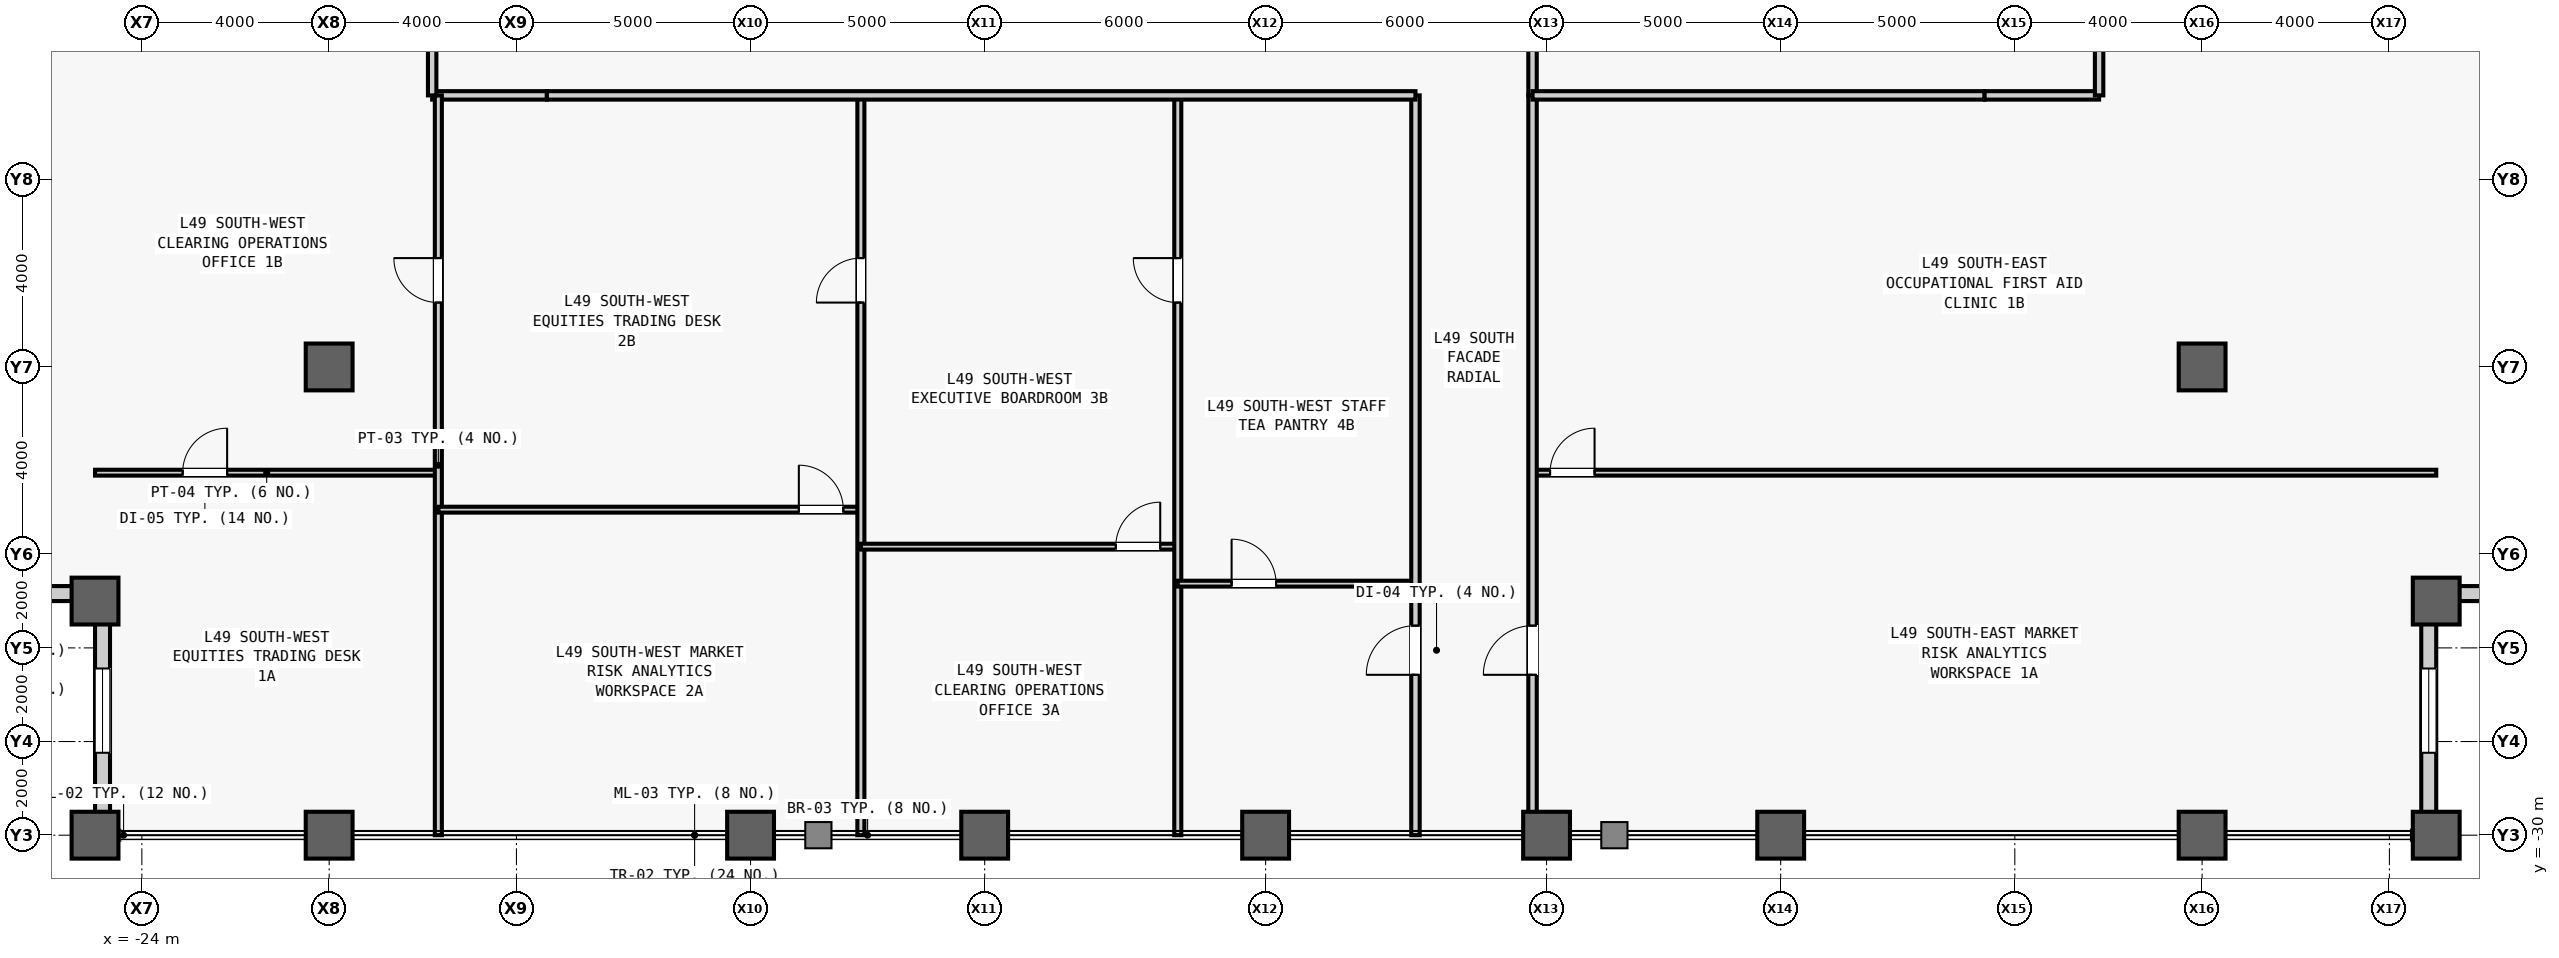
"""IFC4 building model, lengths in metres.
Left out: names, types, materials, properties, quantities, classifications, styles, units other than length and angle.
Written with IfcOpenShell. Run it as: python <this file> out.ifc"""

import sys

from ifc_helpers import new_model, si_unit, direction, frame, frame_2d, origin, origin_2d, place, context, subcontext, project, spatial, rectangle, hollow_rectangle, extrude, source, transform, mapped, element, fill, save


model = new_model("IFC4")
c1 = context("Model", 3, precision=1e-05, world=origin(), true_north=direction((0.0, 1.0)))
c2 = subcontext(c1, "Body", "Model", "MODEL_VIEW")
j1 = project(units=[si_unit("LENGTHUNIT", "METRE"), si_unit("PLANEANGLEUNIT", "RADIAN")], contexts=[c1])
p1 = place(None, origin())
s1 = spatial("IfcSite", under=j1, at=p1, CompositionType="ELEMENT")
p2 = place(p1, origin())
s2 = spatial("IfcBuilding", under=s1, at=p2, CompositionType="ELEMENT")
p3 = place(p2, frame((0.0, 0.0, 211.1)))
s3 = spatial("IfcBuildingStorey", under=s2, at=p3, CompositionType="ELEMENT", Elevation=211.1)
m1 = source(origin(), c2, "Body", "SweptSolid", [
    extrude(hollow_rectangle(XDim=1.0, YDim=1.0, WallThickness=0.055, at=origin_2d()), origin(), (0.0, 0.0, 1.0), 4.0),
])
for number, where, z_axis, x_axis in (
    (1, (-25.0, -30.0, 0.0), (0.0, 0.0, 1.0), (1.0, 0.0, 0.0)),
    (2, (-25.0, -25.0, 0.0), (0.0, 0.0, 1.0), (1.0, 0.0, 0.0)),
    (3, (-20.0, -30.0, 0.0), (0.0, 0.0, 1.0), (1.0, 0.0, 0.0)),
    (4, (-20.0, -20.0, 0.0), (0.0, 0.0, 1.0), (1.0, 0.0, 0.0)),
    (5, (-11.0, -30.0, 0.0), (0.0, 0.0, 1.0), (1.0, 0.0, 0.0)),
    (6, (-6.0, -30.0, 0.0), (0.0, 0.0, 1.0), (1.0, 0.0, 0.0)),
    (7, (0.0, -30.0, 0.0), (0.0, 0.0, 1.0), (1.0, 0.0, 0.0)),
    (8, (6.0, -30.0, 0.0), (0.0, 0.0, 1.0), (1.0, 0.0, 0.0)),
    (9, (11.0, -30.0, 0.0), (0.0, 0.0, 1.0), (1.0, 0.0, 0.0)),
    (10, (20.0, -30.0, 0.0), (0.0, 0.0, 1.0), (1.0, 0.0, 0.0)),
    (11, (20.0, -20.0, 0.0), (0.0, 0.0, 1.0), (1.0, 0.0, 0.0)),
    (12, (25.0, -30.0, 0.0), (0.0, 0.0, 1.0), (1.0, 0.0, 0.0)),
    (13, (25.0, -25.0, 0.0), (0.0, 0.0, 1.0), (1.0, 0.0, 0.0)),
):
    element("IfcColumn", number, at=place(p3, frame(where, z_axis=z_axis, x_axis=x_axis)), inside=s3, PredefinedType="COLUMN", context=c2, shape_type="MappedRepresentation", body=[
        mapped(m1, transform((0.0, 0.0, 0.0), scale=1.0)),
    ])
m2 = source(origin(), c2, "Body", "SweptSolid", [
    extrude(rectangle(XDim=4.68, YDim=0.32, at=frame_2d((2.34, 0.0))), origin(), (0.0, 0.0, 1.0), 3.164),
])
p4 = place(p3, frame((-25.0, -24.84, 0.0), z_axis=(0.0, 0.0, 1.0), x_axis=(-1.0, 0.0, 0.0)))
e14 = element("IfcWall", 14, at=p4, inside=s3, PredefinedType="STANDARD", context=c2, shape_type="MappedRepresentation", body=[
    mapped(m2, transform((0.0, 0.0, 0.0), scale=1.0)),
])
m3 = source(origin(), c2, "Body", "SweptSolid", [
    extrude(rectangle(XDim=1.8, YDim=2.4, at=frame_2d((0.9, 1.2))), frame((0.0, 0.17, 0.0), z_axis=(0.0, -1.0, 0.0), x_axis=(1.0, 0.0, 0.0)), (0.0, 0.0, 1.0), 0.34),
])
p5 = place(p4, frame((1.44, 0.0, 0.5)))
e15 = element("IfcOpeningElement", 15, at=p5, cuts=e14, PredefinedType="OPENING", context=c2, shape_type="MappedRepresentation", body=[
    mapped(m3, transform((0.0, 0.0, 0.0), scale=1.0)),
])
p6 = place(p3, frame((-24.84, -29.68, 0.0), z_axis=(0.0, 0.0, 1.0), x_axis=(0.0, 1.0, 0.0)))
e16 = element("IfcWall", 16, at=p6, inside=s3, PredefinedType="STANDARD", context=c2, shape_type="MappedRepresentation", body=[
    mapped(m2, transform((0.0, 0.0, 0.0), scale=1.0)),
])
p7 = place(p6, frame((1.44, 0.0, 0.5)))
e17 = element("IfcOpeningElement", 17, at=p7, cuts=e16, PredefinedType="OPENING", context=c2, shape_type="MappedRepresentation", body=[
    mapped(m3, transform((0.0, 0.0, 0.0), scale=1.0)),
])
p8 = place(p3, frame((24.84, -29.68, 0.0), z_axis=(0.0, 0.0, 1.0), x_axis=(0.0, 1.0, 0.0)))
e18 = element("IfcWall", 18, at=p8, inside=s3, PredefinedType="STANDARD", context=c2, shape_type="MappedRepresentation", body=[
    mapped(m2, transform((0.0, 0.0, 0.0), scale=1.0)),
])
p9 = place(p8, frame((1.44, 0.0, 0.5)))
e19 = element("IfcOpeningElement", 19, at=p9, cuts=e18, PredefinedType="OPENING", context=c2, shape_type="MappedRepresentation", body=[
    mapped(m3, transform((0.0, 0.0, 0.0), scale=1.0)),
])
p10 = place(p3, frame((25.0, -24.84, 0.0), z_axis=(0.0, 0.0, 1.0), x_axis=(1.0, 0.0, 0.0)))
e20 = element("IfcWall", 20, at=p10, inside=s3, PredefinedType="STANDARD", context=c2, shape_type="MappedRepresentation", body=[
    mapped(m2, transform((0.0, 0.0, 0.0), scale=1.0)),
])
p11 = place(p10, frame((1.44, 0.0, 0.5)))
e21 = element("IfcOpeningElement", 21, at=p11, cuts=e20, PredefinedType="OPENING", context=c2, shape_type="MappedRepresentation", body=[
    mapped(m3, transform((0.0, 0.0, 0.0), scale=1.0)),
])
m4 = source(origin(), c2, "Body", "SweptSolid", [
    extrude(rectangle(XDim=2.45, YDim=0.18, at=frame_2d((1.225, 0.0))), origin(), (0.0, 0.0, 1.0), 3.78),
])
for number, where, z_axis, x_axis in (
    (22, (15.35, -14.2, 0.0), (0.0, 0.0, 1.0), (1.0, 0.0, 0.0)),
    (23, (-17.8, -14.2, 0.0), (0.0, 0.0, 1.0), (1.0, 0.0, 0.0)),
):
    element("IfcWall", number, at=place(p3, frame(where, z_axis=z_axis, x_axis=x_axis)), inside=s3, PredefinedType="PARTITIONING", context=c2, shape_type="MappedRepresentation", body=[
        mapped(m4, transform((0.0, 0.0, 0.0), scale=1.0)),
    ])
m5 = source(origin(), c2, "Body", "SweptSolid", [
    extrude(rectangle(XDim=3.2, YDim=0.18, at=frame_2d((1.6, 0.0))), origin(), (0.0, 0.0, 1.0), 3.085),
])
p12 = place(p3, frame((5.7, -14.2, 0.0), z_axis=(0.0, 0.0, 1.0), x_axis=(0.0, 1.0, 0.0)))
e24 = element("IfcWall", 24, at=p12, inside=s3, PredefinedType="PARTITIONING", context=c2, shape_type="MappedRepresentation", body=[
    mapped(m5, transform((0.0, 0.0, 0.0), scale=1.0)),
])
m6 = source(origin(), c2, "Body", "SweptSolid", [
    extrude(rectangle(XDim=7.332, YDim=0.125, at=frame_2d((3.666, 0.0))), origin(), (0.0, 0.0, 1.0), 3.78),
])
p13 = place(p3, frame((-25.0, -22.258, 0.0), z_axis=(0.0, 0.0, 1.0), x_axis=(1.0, 0.0, 0.0)))
e25 = element("IfcWall", 25, at=p13, inside=s3, PredefinedType="PARTITIONING", context=c2, shape_type="MappedRepresentation", body=[
    mapped(m6, transform((0.0, 0.0, 0.0), scale=1.0)),
])
m7 = source(origin(), c2, "Body", "SweptSolid", [
    extrude(rectangle(XDim=0.95, YDim=2.15, at=frame_2d((0.475, 1.075))), frame((0.0, 0.073, 0.0), z_axis=(0.0, -1.0, 0.0), x_axis=(1.0, 0.0, 0.0)), (0.0, 0.0, 1.0), 0.145),
])
p14 = place(p13, frame((1.871, 0.0, 0.0)))
e26 = element("IfcOpeningElement", 26, at=p14, cuts=e25, PredefinedType="OPENING", context=c2, shape_type="MappedRepresentation", body=[
    mapped(m7, transform((0.0, 0.0, 0.0), scale=1.0)),
])
m8 = source(origin(), c2, "Body", "SweptSolid", [
    extrude(rectangle(XDim=15.8, YDim=0.15, at=frame_2d((7.9, 0.0))), origin(), (0.0, 0.0, 1.0), 3.78),
])
p15 = place(p3, frame((-17.668, -30.0, 0.0), z_axis=(0.0, 0.0, 1.0), x_axis=(0.0, 1.0, 0.0)))
e27 = element("IfcWall", 27, at=p15, inside=s3, PredefinedType="PARTITIONING", context=c2, shape_type="MappedRepresentation", body=[
    mapped(m8, transform((0.0, 0.0, 0.0), scale=1.0)),
])
m9 = source(origin(), c2, "Body", "SweptSolid", [
    extrude(rectangle(XDim=0.95, YDim=2.15, at=frame_2d((0.475, 1.075))), frame((0.0, 0.085, 0.0), z_axis=(0.0, -1.0, 0.0), x_axis=(1.0, 0.0, 0.0)), (0.0, 0.0, 1.0), 0.17),
])
p16 = place(p15, frame((11.375, 0.0, 0.0)))
e28 = element("IfcOpeningElement", 28, at=p16, cuts=e27, PredefinedType="OPENING", context=c2, shape_type="MappedRepresentation", body=[
    mapped(m9, transform((0.0, 0.0, 0.0), scale=1.0)),
])
m10 = source(origin(), c2, "Body", "SweptSolid", [
    extrude(rectangle(XDim=9.024, YDim=0.125, at=frame_2d((4.512, 0.0))), origin(), (0.0, 0.0, 1.0), 3.78),
])
p17 = place(p3, frame((-17.668, -23.048, 0.0), z_axis=(0.0, 0.0, 1.0), x_axis=(1.0, 0.0, 0.0)))
e29 = element("IfcWall", 29, at=p17, inside=s3, PredefinedType="PARTITIONING", context=c2, shape_type="MappedRepresentation", body=[
    mapped(m10, transform((0.0, 0.0, 0.0), scale=1.0)),
])
p18 = place(p17, frame((7.699, 0.0, 0.0)))
e30 = element("IfcOpeningElement", 30, at=p18, cuts=e29, PredefinedType="OPENING", context=c2, shape_type="MappedRepresentation", body=[
    mapped(m7, transform((0.0, 0.0, 0.0), scale=1.0)),
])
p19 = place(p3, frame((-8.644, -30.0, 0.0), z_axis=(0.0, 0.0, 1.0), x_axis=(0.0, 1.0, 0.0)))
e31 = element("IfcWall", 31, at=p19, inside=s3, PredefinedType="PARTITIONING", context=c2, shape_type="MappedRepresentation", body=[
    mapped(m8, transform((0.0, 0.0, 0.0), scale=1.0)),
])
p20 = place(p19, frame((11.375, 0.0, 0.0)))
e32 = element("IfcOpeningElement", 32, at=p20, cuts=e31, PredefinedType="OPENING", context=c2, shape_type="MappedRepresentation", body=[
    mapped(m9, transform((0.0, 0.0, 0.0), scale=1.0)),
])
m11 = source(origin(), c2, "Body", "SweptSolid", [
    extrude(rectangle(XDim=6.768, YDim=0.125, at=frame_2d((3.384, 0.0))), origin(), (0.0, 0.0, 1.0), 3.78),
])
p21 = place(p3, frame((-8.644, -23.838, 0.0), z_axis=(0.0, 0.0, 1.0), x_axis=(1.0, 0.0, 0.0)))
e33 = element("IfcWall", 33, at=p21, inside=s3, PredefinedType="PARTITIONING", context=c2, shape_type="MappedRepresentation", body=[
    mapped(m11, transform((0.0, 0.0, 0.0), scale=1.0)),
])
p22 = place(p21, frame((5.443, 0.0, 0.0)))
e34 = element("IfcOpeningElement", 34, at=p22, cuts=e33, PredefinedType="OPENING", context=c2, shape_type="MappedRepresentation", body=[
    mapped(m7, transform((0.0, 0.0, 0.0), scale=1.0)),
])
p23 = place(p3, frame((-1.876, -30.0, 0.0), z_axis=(0.0, 0.0, 1.0), x_axis=(0.0, 1.0, 0.0)))
e35 = element("IfcWall", 35, at=p23, inside=s3, PredefinedType="PARTITIONING", context=c2, shape_type="MappedRepresentation", body=[
    mapped(m8, transform((0.0, 0.0, 0.0), scale=1.0)),
])
p24 = place(p23, frame((11.375, 0.0, 0.0)))
e36 = element("IfcOpeningElement", 36, at=p24, cuts=e35, PredefinedType="OPENING", context=c2, shape_type="MappedRepresentation", body=[
    mapped(m9, transform((0.0, 0.0, 0.0), scale=1.0)),
])
m12 = source(origin(), c2, "Body", "SweptSolid", [
    extrude(rectangle(XDim=5.076, YDim=0.125, at=frame_2d((2.538, 0.0))), origin(), (0.0, 0.0, 1.0), 3.78),
])
p25 = place(p3, frame((-1.876, -24.628, 0.0), z_axis=(0.0, 0.0, 1.0), x_axis=(1.0, 0.0, 0.0)))
e37 = element("IfcWall", 37, at=p25, inside=s3, PredefinedType="PARTITIONING", context=c2, shape_type="MappedRepresentation", body=[
    mapped(m12, transform((0.0, 0.0, 0.0), scale=1.0)),
])
p26 = place(p25, frame((1.149, 0.0, 0.0)))
e38 = element("IfcOpeningElement", 38, at=p26, cuts=e37, PredefinedType="OPENING", context=c2, shape_type="MappedRepresentation", body=[
    mapped(m7, transform((0.0, 0.0, 0.0), scale=1.0)),
])
m13 = source(origin(), c2, "Body", "SweptSolid", [
    extrude(rectangle(XDim=15.8, YDim=0.18, at=frame_2d((7.9, 0.0))), origin(), (0.0, 0.0, 1.0), 3.78),
])
p27 = place(p3, frame((3.2, -30.0, 0.0), z_axis=(0.0, 0.0, 1.0), x_axis=(0.0, 1.0, 0.0)))
e39 = element("IfcWall", 39, at=p27, inside=s3, PredefinedType="PARTITIONING", context=c2, shape_type="MappedRepresentation", body=[
    mapped(m13, transform((0.0, 0.0, 0.0), scale=1.0)),
])
m14 = source(origin(), c2, "Body", "SweptSolid", [
    extrude(rectangle(XDim=1.05, YDim=2.2, at=frame_2d((0.525, 1.1))), frame((0.0, 0.1, 0.0), z_axis=(0.0, -1.0, 0.0), x_axis=(1.0, 0.0, 0.0)), (0.0, 0.0, 1.0), 0.2),
])
p28 = place(p27, frame((3.425, 0.0, 0.0)))
e40 = element("IfcOpeningElement", 40, at=p28, cuts=e39, PredefinedType="OPENING", context=c2, shape_type="MappedRepresentation", body=[
    mapped(m14, transform((0.0, 0.0, 0.0), scale=1.0)),
])
m15 = source(origin(), c2, "Body", "SweptSolid", [
    extrude(rectangle(XDim=18.55, YDim=0.18, at=frame_2d((9.275, 0.0))), origin(), (0.0, 0.0, 1.0), 3.78),
])
p29 = place(p3, frame((-15.35, -14.2, 0.0), z_axis=(0.0, 0.0, 1.0), x_axis=(1.0, 0.0, 0.0)))
e41 = element("IfcWall", 41, at=p29, inside=s3, PredefinedType="PARTITIONING", context=c2, shape_type="MappedRepresentation", body=[
    mapped(m15, transform((0.0, 0.0, 0.0), scale=1.0)),
])
m16 = source(origin(), c2, "Body", "SweptSolid", [
    extrude(rectangle(XDim=19.3, YDim=0.125, at=frame_2d((9.65, 0.0))), origin(), (0.0, 0.0, 1.0), 3.78),
])
p30 = place(p3, frame((5.7, -22.258, 0.0), z_axis=(0.0, 0.0, 1.0), x_axis=(1.0, 0.0, 0.0)))
e42 = element("IfcWall", 42, at=p30, inside=s3, PredefinedType="PARTITIONING", context=c2, shape_type="MappedRepresentation", body=[
    mapped(m16, transform((0.0, 0.0, 0.0), scale=1.0)),
])
p31 = place(p30, frame((0.375, 0.0, 0.0)))
e43 = element("IfcOpeningElement", 43, at=p31, cuts=e42, PredefinedType="OPENING", context=c2, shape_type="MappedRepresentation", body=[
    mapped(m7, transform((0.0, 0.0, 0.0), scale=1.0)),
])
m17 = source(origin(), c2, "Body", "SweptSolid", [
    extrude(rectangle(XDim=15.8, YDim=0.18, at=frame_2d((7.9, 0.0))), origin(), (0.0, 0.0, 1.0), 3.085),
])
p32 = place(p3, frame((5.7, -30.0, 0.0), z_axis=(0.0, 0.0, 1.0), x_axis=(0.0, 1.0, 0.0)))
e44 = element("IfcWall", 44, at=p32, inside=s3, PredefinedType="PARTITIONING", context=c2, shape_type="MappedRepresentation", body=[
    mapped(m17, transform((0.0, 0.0, 0.0), scale=1.0)),
])
p33 = place(p32, frame((3.425, 0.0, 0.0)))
e45 = element("IfcOpeningElement", 45, at=p33, cuts=e44, PredefinedType="OPENING", context=c2, shape_type="MappedRepresentation", body=[
    mapped(m14, transform((0.0, 0.0, 0.0), scale=1.0)),
])
m18 = source(origin(), c2, "Body", "SweptSolid", [
    extrude(rectangle(XDim=9.65, YDim=0.18, at=frame_2d((4.825, 0.0))), origin(), (0.0, 0.0, 1.0), 3.78),
])
p34 = place(p3, frame((5.7, -14.2, 0.0), z_axis=(0.0, 0.0, 1.0), x_axis=(1.0, 0.0, 0.0)))
e46 = element("IfcWall", 46, at=p34, inside=s3, PredefinedType="PARTITIONING", context=c2, shape_type="MappedRepresentation", body=[
    mapped(m18, transform((0.0, 0.0, 0.0), scale=1.0)),
])
m19 = source(origin(), c2, "Body", "SweptSolid", [
    extrude(rectangle(XDim=13.25, YDim=0.18, at=frame_2d((6.625, 0.0))), origin(), (0.0, 0.0, 1.0), 3.78),
])
p35 = place(p3, frame((-17.8, -14.2, 0.0), z_axis=(0.0, 0.0, 1.0), x_axis=(0.0, 1.0, 0.0)))
e47 = element("IfcWall", 47, at=p35, inside=s3, PredefinedType="PARTITIONING", context=c2, shape_type="MappedRepresentation", body=[
    mapped(m19, transform((0.0, 0.0, 0.0), scale=1.0)),
])
m20 = source(origin(), c2, "Body", "SweptSolid", [
    extrude(rectangle(XDim=14.75, YDim=0.18, at=frame_2d((7.375, 0.0))), origin(), (0.0, 0.0, 1.0), 3.78),
])
p36 = place(p3, frame((17.8, -14.2, 0.0), z_axis=(0.0, 0.0, 1.0), x_axis=(0.0, 1.0, 0.0)))
e48 = element("IfcWall", 48, at=p36, inside=s3, PredefinedType="PARTITIONING", context=c2, shape_type="MappedRepresentation", body=[
    mapped(m20, transform((0.0, 0.0, 0.0), scale=1.0)),
])
m21 = source(origin(), c2, "Body", "SweptSolid", [
    extrude(rectangle(XDim=1.8, YDim=2.4, at=frame_2d((0.9, 1.2))), frame((0.0, 0.03, 0.0), z_axis=(0.0, -1.0, 0.0), x_axis=(1.0, 0.0, 0.0)), (0.0, 0.0, 1.0), 0.06),
])
p37 = place(p7, origin())
e49 = element("IfcWindow", 49, at=p37, inside=s3, PartitioningType="SINGLE_PANEL", PredefinedType="WINDOW", context=c2, shape_type="MappedRepresentation", body=[
    mapped(m21, transform((0.0, 0.0, 0.0), scale=1.0)),
])
fill(e17, e49)
p38 = place(p9, origin())
e50 = element("IfcWindow", 50, at=p38, inside=s3, PartitioningType="SINGLE_PANEL", PredefinedType="WINDOW", context=c2, shape_type="MappedRepresentation", body=[
    mapped(m21, transform((0.0, 0.0, 0.0), scale=1.0)),
])
fill(e19, e50)
m22 = source(origin(), c2, "Body", "SweptSolid", [
    extrude(rectangle(XDim=0.95, YDim=2.15, at=frame_2d((0.475, 1.075))), frame((0.0, 0.025, 0.0), z_axis=(0.0, -1.0, 0.0), x_axis=(1.0, 0.0, 0.0)), (0.0, 0.0, 1.0), 0.05),
])
p39 = place(p14, origin())
e51 = element("IfcDoor", 51, at=p39, inside=s3, OperationType="SINGLE_SWING_RIGHT", PredefinedType="DOOR", context=c2, shape_type="MappedRepresentation", body=[
    mapped(m22, transform((0.0, 0.0, 0.0), scale=1.0)),
])
fill(e26, e51)
p40 = place(p16, origin())
e52 = element("IfcDoor", 52, at=p40, inside=s3, OperationType="SINGLE_SWING_RIGHT", PredefinedType="DOOR", context=c2, shape_type="MappedRepresentation", body=[
    mapped(m22, transform((0.0, 0.0, 0.0), scale=1.0)),
])
fill(e28, e52)
p41 = place(p18, origin())
e53 = element("IfcDoor", 53, at=p41, inside=s3, OperationType="SINGLE_SWING_LEFT", PredefinedType="DOOR", context=c2, shape_type="MappedRepresentation", body=[
    mapped(m22, transform((0.0, 0.0, 0.0), scale=1.0)),
])
fill(e30, e53)
p42 = place(p20, origin())
e54 = element("IfcDoor", 54, at=p42, inside=s3, OperationType="SINGLE_SWING_LEFT", PredefinedType="DOOR", context=c2, shape_type="MappedRepresentation", body=[
    mapped(m22, transform((0.0, 0.0, 0.0), scale=1.0)),
])
fill(e32, e54)
p43 = place(p22, origin())
e55 = element("IfcDoor", 55, at=p43, inside=s3, OperationType="SINGLE_SWING_RIGHT", PredefinedType="DOOR", context=c2, shape_type="MappedRepresentation", body=[
    mapped(m22, transform((0.0, 0.0, 0.0), scale=1.0)),
])
fill(e34, e55)
p44 = place(p24, origin())
e56 = element("IfcDoor", 56, at=p44, inside=s3, OperationType="SINGLE_SWING_RIGHT", PredefinedType="DOOR", context=c2, shape_type="MappedRepresentation", body=[
    mapped(m22, transform((0.0, 0.0, 0.0), scale=1.0)),
])
fill(e36, e56)
p45 = place(p26, origin())
e57 = element("IfcDoor", 57, at=p45, inside=s3, OperationType="SINGLE_SWING_LEFT", PredefinedType="DOOR", context=c2, shape_type="MappedRepresentation", body=[
    mapped(m22, transform((0.0, 0.0, 0.0), scale=1.0)),
])
fill(e38, e57)
m23 = source(origin(), c2, "Body", "SweptSolid", [
    extrude(rectangle(XDim=1.05, YDim=2.2, at=frame_2d((0.525, 1.1))), frame((0.0, 0.025, 0.0), z_axis=(0.0, -1.0, 0.0), x_axis=(1.0, 0.0, 0.0)), (0.0, 0.0, 1.0), 0.05),
])
p46 = place(p28, origin())
e58 = element("IfcDoor", 58, at=p46, inside=s3, OperationType="SINGLE_SWING_LEFT", PredefinedType="DOOR", context=c2, shape_type="MappedRepresentation", body=[
    mapped(m23, transform((0.0, 0.0, 0.0), scale=1.0)),
])
fill(e40, e58)
p47 = place(p31, origin())
e59 = element("IfcDoor", 59, at=p47, inside=s3, OperationType="SINGLE_SWING_RIGHT", PredefinedType="DOOR", context=c2, shape_type="MappedRepresentation", body=[
    mapped(m22, transform((0.0, 0.0, 0.0), scale=1.0)),
])
fill(e43, e59)
p48 = place(p33, origin())
e60 = element("IfcDoor", 60, at=p48, inside=s3, OperationType="SINGLE_SWING_LEFT", PredefinedType="DOOR", context=c2, shape_type="MappedRepresentation", body=[
    mapped(m23, transform((0.0, 0.0, 0.0), scale=1.0)),
])
fill(e45, e60)
save(model, sys.argv[1])
